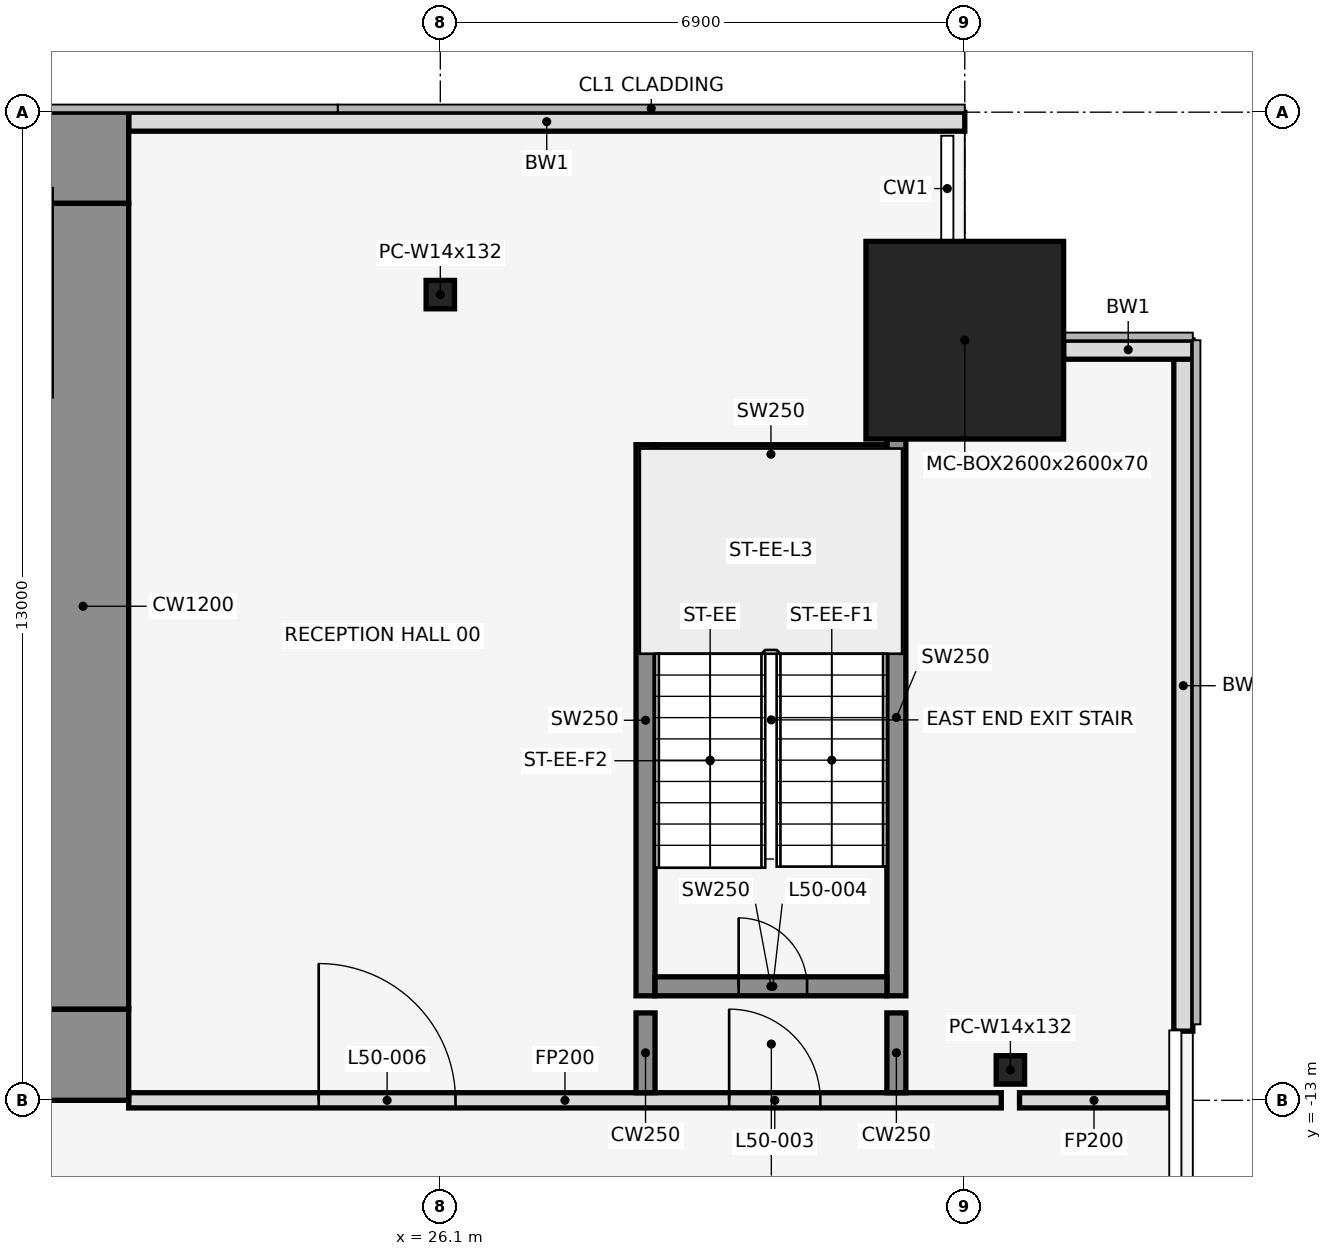
"""IFC4 building model, lengths in metres.
Left out: names, types, materials, properties, quantities, classifications, styles, units other than length and angle.
Written with IfcOpenShell. Run it as: python <this file> out.ifc"""

import sys

from ifc_helpers import new_model, si_unit, direction, frame, frame_2d, origin, origin_2d, place, context, subcontext, project, spatial, rectangle, hollow_rectangle, i_section, extrude, element, fill, save


model = new_model("IFC4")
c1 = context("Model", 3, precision=1e-05, world=origin(), true_north=direction((0.0, 1.0)))
c2 = subcontext(c1, "Body", "Model", "MODEL_VIEW")
j1 = project(units=[si_unit("LENGTHUNIT", "METRE"), si_unit("PLANEANGLEUNIT", "RADIAN")], contexts=[c1])
p1 = place(None, origin())
s1 = spatial("IfcSite", under=j1, at=p1, CompositionType="ELEMENT")
p2 = place(p1, origin())
s2 = spatial("IfcBuilding", under=s1, at=p2, CompositionType="ELEMENT")
p3 = place(p2, frame((0.0, 0.0, 223.7)))
s3 = spatial("IfcBuildingStorey", under=s2, at=p3, CompositionType="ELEMENT", Elevation=223.7)
p4 = place(p3, frame((26.1, -2.4, 0.0), z_axis=(0.0, 0.0, 1.0), x_axis=(1.0, 0.0, 0.0)))
e1 = element("IfcColumn", 1, at=p4, inside=s3, PredefinedType="COLUMN", context=c2, shape_type="SweptSolid", body=[
    extrude(i_section(OverallWidth=0.373, OverallDepth=0.373, WebThickness=0.016, FlangeThickness=0.026, at=origin_2d()), origin(), (0.0, 0.0, 1.0), 4.1),
])
p5 = place(p3, frame((33.0, -3.0, 0.0), z_axis=(0.0, 0.0, 1.0), x_axis=(1.0, 0.0, 0.0)))
e2 = element("IfcColumn", 2, at=p5, inside=s3, PredefinedType="COLUMN", context=c2, shape_type="SweptSolid", body=[
    extrude(hollow_rectangle(XDim=2.6, YDim=2.6, WallThickness=0.07, at=origin_2d()), origin(), (0.0, 0.0, 1.0), 4.1),
])
p6 = place(p3, frame((33.6, -12.6, 0.0), z_axis=(0.0, 0.0, 1.0), x_axis=(1.0, 0.0, 0.0)))
e3 = element("IfcColumn", 3, at=p6, inside=s3, PredefinedType="COLUMN", context=c2, shape_type="SweptSolid", body=[
    extrude(i_section(OverallWidth=0.373, OverallDepth=0.373, WebThickness=0.016, FlangeThickness=0.026, at=origin_2d()), origin(), (0.0, 0.0, 1.0), 4.1),
])
p7 = place(p3, frame((33.0, -0.125, 0.0), z_axis=(0.0, 0.0, 1.0), x_axis=(-1.0, 0.0, 0.0)))
e4 = element("IfcWall", 4, at=p7, inside=s3, PredefinedType="STANDARD", context=c2, shape_type="SweptSolid", body=[
    extrude(rectangle(XDim=11.0, YDim=0.25, at=frame_2d((5.5, 0.0))), origin(), (0.0, 0.0, 1.0), 3.95),
])
p8 = place(p3, frame((35.875, -12.09, 0.0), z_axis=(0.0, 0.0, 1.0), x_axis=(0.0, 1.0, 0.0)))
e5 = element("IfcWall", 5, at=p8, inside=s3, PredefinedType="STANDARD", context=c2, shape_type="SweptSolid", body=[
    extrude(rectangle(XDim=9.09, YDim=0.25, at=frame_2d((4.545, 0.0))), origin(), (0.0, 0.0, 1.0), 3.95),
])
p9 = place(p3, frame((36.0, -3.125, 0.0), z_axis=(0.0, 0.0, 1.0), x_axis=(-1.0, 0.0, 0.0)))
e6 = element("IfcWall", 6, at=p9, inside=s3, PredefinedType="STANDARD", context=c2, shape_type="SweptSolid", body=[
    extrude(rectangle(XDim=1.7, YDim=0.25, at=frame_2d((0.85, 0.0))), origin(), (0.0, 0.0, 1.0), 3.95),
])
p10 = place(p3, frame((28.8, -11.625, 0.0), z_axis=(0.0, 0.0, 1.0), x_axis=(0.0, 1.0, 0.0)))
e7 = element("IfcWall", 7, at=p10, inside=s3, PredefinedType="SHEAR", context=c2, shape_type="SweptSolid", body=[
    extrude(rectangle(XDim=7.25, YDim=0.25, at=frame_2d((3.625, 0.0))), origin(), (0.0, 0.0, 1.0), 4.1),
])
p11 = place(p3, frame((32.1, -11.625, 0.0), z_axis=(0.0, 0.0, 1.0), x_axis=(0.0, 1.0, 0.0)))
e8 = element("IfcWall", 8, at=p11, inside=s3, PredefinedType="SHEAR", context=c2, shape_type="SweptSolid", body=[
    extrude(rectangle(XDim=7.325, YDim=0.25, at=frame_2d((3.663, 0.0))), origin(), (0.0, 0.0, 1.0), 4.1),
])
p12 = place(p3, frame((28.925, -11.5, 0.0), z_axis=(0.0, 0.0, 1.0), x_axis=(1.0, 0.0, 0.0)))
e9 = element("IfcWall", 9, at=p12, inside=s3, PredefinedType="SHEAR", context=c2, shape_type="SweptSolid", body=[
    extrude(rectangle(XDim=3.05, YDim=0.25, at=frame_2d((1.525, 0.0))), origin(), (0.0, 0.0, 1.0), 4.1),
])
p13 = place(p12, frame((1.1, 0.0, 0.0)))
e10 = element("IfcOpeningElement", 10, at=p13, cuts=e9, PredefinedType="OPENING", context=c2, shape_type="SweptSolid", body=[
    extrude(rectangle(XDim=0.9, YDim=2.1, at=frame_2d((0.45, 1.05))), frame((0.0, 0.137, 0.0), z_axis=(0.0, -1.0, 0.0), x_axis=(1.0, 0.0, 0.0)), (0.0, 0.0, 1.0), 0.274),
])
p14 = place(p3, frame((28.925, -4.5, 0.0), z_axis=(0.0, 0.0, 1.0), x_axis=(1.0, 0.0, 0.0)))
e11 = element("IfcWall", 11, at=p14, inside=s3, PredefinedType="SHEAR", context=c2, shape_type="SweptSolid", body=[
    extrude(rectangle(XDim=3.05, YDim=0.25, at=frame_2d((1.525, 0.0))), origin(), (0.0, 0.0, 1.0), 4.1),
])
p15 = place(p3, frame((22.0, -13.0, 0.0), z_axis=(0.0, 0.0, 1.0), x_axis=(1.0, 0.0, 0.0)))
e12 = element("IfcWall", 12, at=p15, inside=s3, PredefinedType="PARTITIONING", context=c2, shape_type="SweptSolid", body=[
    extrude(rectangle(XDim=11.48, YDim=0.2, at=frame_2d((5.74, 0.0))), origin(), (0.0, 0.0, 1.0), 2.84),
])
p16 = place(p15, frame((7.9, 0.0, 0.0)))
e13 = element("IfcOpeningElement", 13, at=p16, cuts=e12, PredefinedType="OPENING", context=c2, shape_type="SweptSolid", body=[
    extrude(rectangle(XDim=1.2, YDim=2.1, at=frame_2d((0.6, 1.05))), frame((0.0, 0.112, 0.0), z_axis=(0.0, -1.0, 0.0), x_axis=(1.0, 0.0, 0.0)), (0.0, 0.0, 1.0), 0.224),
])
p17 = place(p15, frame((2.5, 0.0, 0.0)))
e14 = element("IfcOpeningElement", 14, at=p17, cuts=e12, PredefinedType="OPENING", context=c2, shape_type="SweptSolid", body=[
    extrude(rectangle(XDim=1.8, YDim=2.1, at=frame_2d((0.9, 1.05))), frame((0.0, 0.112, 0.0), z_axis=(0.0, -1.0, 0.0), x_axis=(1.0, 0.0, 0.0)), (0.0, 0.0, 1.0), 0.224),
])
p18 = place(p3, frame((33.72, -13.0, 0.0), z_axis=(0.0, 0.0, 1.0), x_axis=(1.0, 0.0, 0.0)))
e15 = element("IfcWall", 15, at=p18, inside=s3, PredefinedType="PARTITIONING", context=c2, shape_type="SweptSolid", body=[
    extrude(rectangle(XDim=1.96, YDim=0.2, at=frame_2d((0.98, 0.0))), origin(), (0.0, 0.0, 1.0), 2.84),
])
for number, where, z_axis, x_axis in (
    (16, (28.8, -12.9, 0.0), (0.0, 0.0, 1.0), (0.0, 1.0, 0.0)),
    (17, (32.1, -12.9, 0.0), (0.0, 0.0, 1.0), (0.0, 1.0, 0.0)),
):
    element("IfcWall", number, at=place(p3, frame(where, z_axis=z_axis, x_axis=x_axis)), inside=s3, PredefinedType="SHEAR", context=c2, shape_type="SweptSolid", body=[
        extrude(rectangle(XDim=1.05, YDim=0.25, at=frame_2d((0.525, 0.0))), origin(), (0.0, 0.0, 1.0), 4.1),
    ])
p19 = place(p3, frame((-22.0, -0.6, 0.0), z_axis=(0.0, 0.0, 1.0), x_axis=(1.0, 0.0, 0.0)))
e18 = element("IfcWall", 18, at=p19, inside=s3, PredefinedType="SHEAR", context=c2, shape_type="SweptSolid", body=[
    extrude(rectangle(XDim=44.0, YDim=1.2, at=frame_2d((22.0, 0.0))), origin(), (0.0, 0.0, 1.0), 4.1),
])
p20 = place(p19, frame((18.55, 0.0, 0.0)))
e19 = element("IfcOpeningElement", 19, at=p20, cuts=e18, PredefinedType="OPENING", context=c2, shape_type="SweptSolid", body=[
    extrude(rectangle(XDim=0.9, YDim=2.1, at=frame_2d((0.45, 1.05))), frame((0.0, 0.612, 0.0), z_axis=(0.0, -1.0, 0.0), x_axis=(1.0, 0.0, 0.0)), (0.0, 0.0, 1.0), 1.224),
])
p21 = place(p19, frame((24.55, 0.0, 0.0)))
e20 = element("IfcOpeningElement", 20, at=p21, cuts=e18, PredefinedType="OPENING", context=c2, shape_type="SweptSolid", body=[
    extrude(rectangle(XDim=0.9, YDim=2.1, at=frame_2d((0.45, 1.05))), frame((0.0, 0.612, 0.0), z_axis=(0.0, -1.0, 0.0), x_axis=(1.0, 0.0, 0.0)), (0.0, 0.0, 1.0), 1.224),
])
p22 = place(p3, frame((-22.0, -12.4, 0.0), z_axis=(0.0, 0.0, 1.0), x_axis=(1.0, 0.0, 0.0)))
e21 = element("IfcWall", 21, at=p22, inside=s3, PredefinedType="SHEAR", context=c2, shape_type="SweptSolid", body=[
    extrude(rectangle(XDim=44.0, YDim=1.2, at=frame_2d((22.0, 0.0))), origin(), (0.0, 0.0, 1.0), 4.1),
])
p23 = place(p22, frame((2.2, 0.0, 0.0)))
e22 = element("IfcOpeningElement", 22, at=p23, cuts=e21, PredefinedType="OPENING", context=c2, shape_type="SweptSolid", body=[
    extrude(rectangle(XDim=1.2, YDim=2.1, at=frame_2d((0.6, 1.05))), frame((0.0, 0.612, 0.0), z_axis=(0.0, -1.0, 0.0), x_axis=(1.0, 0.0, 0.0)), (0.0, 0.0, 1.0), 1.224),
])
p24 = place(p22, frame((21.4, 0.0, 0.0)))
e23 = element("IfcOpeningElement", 23, at=p24, cuts=e21, PredefinedType="OPENING", context=c2, shape_type="SweptSolid", body=[
    extrude(rectangle(XDim=1.2, YDim=2.1, at=frame_2d((0.6, 1.05))), frame((0.0, 0.612, 0.0), z_axis=(0.0, -1.0, 0.0), x_axis=(1.0, 0.0, 0.0)), (0.0, 0.0, 1.0), 1.224),
])
p25 = place(p22, frame((40.6, 0.0, 0.0)))
e24 = element("IfcOpeningElement", 24, at=p25, cuts=e21, PredefinedType="OPENING", context=c2, shape_type="SweptSolid", body=[
    extrude(rectangle(XDim=1.2, YDim=2.1, at=frame_2d((0.6, 1.05))), frame((0.0, 0.612, 0.0), z_axis=(0.0, -1.0, 0.0), x_axis=(1.0, 0.0, 0.0)), (0.0, 0.0, 1.0), 1.224),
])
p26 = place(p22, frame((16.0, 0.0, 0.0)))
e25 = element("IfcOpeningElement", 25, at=p26, cuts=e21, PredefinedType="OPENING", context=c2, shape_type="SweptSolid", body=[
    extrude(rectangle(XDim=1.8, YDim=2.1, at=frame_2d((0.9, 1.05))), frame((0.0, 0.612, 0.0), z_axis=(0.0, -1.0, 0.0), x_axis=(1.0, 0.0, 0.0)), (0.0, 0.0, 1.0), 1.224),
])
p27 = place(p22, frame((6.3, 0.0, 0.0)))
e26 = element("IfcOpeningElement", 26, at=p27, cuts=e21, PredefinedType="OPENING", context=c2, shape_type="SweptSolid", body=[
    extrude(rectangle(XDim=1.2, YDim=2.1, at=frame_2d((0.6, 1.05))), frame((0.0, 0.612, 0.0), z_axis=(0.0, -1.0, 0.0), x_axis=(1.0, 0.0, 0.0)), (0.0, 0.0, 1.0), 1.224),
])
p28 = place(p22, frame((26.2, 0.0, 0.0)))
e27 = element("IfcOpeningElement", 27, at=p28, cuts=e21, PredefinedType="OPENING", context=c2, shape_type="SweptSolid", body=[
    extrude(rectangle(XDim=1.8, YDim=2.1, at=frame_2d((0.9, 1.05))), frame((0.0, 0.612, 0.0), z_axis=(0.0, -1.0, 0.0), x_axis=(1.0, 0.0, 0.0)), (0.0, 0.0, 1.0), 1.224),
])
p29 = place(p22, frame((36.5, 0.0, 0.0)))
e28 = element("IfcOpeningElement", 28, at=p29, cuts=e21, PredefinedType="OPENING", context=c2, shape_type="SweptSolid", body=[
    extrude(rectangle(XDim=1.2, YDim=2.1, at=frame_2d((0.6, 1.05))), frame((0.0, 0.612, 0.0), z_axis=(0.0, -1.0, 0.0), x_axis=(1.0, 0.0, 0.0)), (0.0, 0.0, 1.0), 1.224),
])
p30 = place(p3, frame((21.4, -11.8, 0.0), z_axis=(0.0, 0.0, 1.0), x_axis=(0.0, 1.0, 0.0)))
e29 = element("IfcWall", 29, at=p30, inside=s3, PredefinedType="SHEAR", context=c2, shape_type="SweptSolid", body=[
    extrude(rectangle(XDim=10.6, YDim=1.2, at=frame_2d((5.3, 0.0))), origin(), (0.0, 0.0, 1.0), 4.1),
])
p31 = place(p16, origin())
e30 = element("IfcDoor", 30, at=p31, inside=s3, OperationType="SINGLE_SWING_RIGHT", PredefinedType="DOOR", context=c2, shape_type="SweptSolid", body=[
    extrude(rectangle(XDim=1.2, YDim=2.1, at=frame_2d((0.6, 1.05))), frame((0.0, 0.025, 0.0), z_axis=(0.0, -1.0, 0.0), x_axis=(1.0, 0.0, 0.0)), (0.0, 0.0, 1.0), 0.05),
])
fill(e13, e30)
p32 = place(p13, origin())
e31 = element("IfcDoor", 31, at=p32, inside=s3, OperationType="SINGLE_SWING_LEFT", PredefinedType="DOOR", context=c2, shape_type="SweptSolid", body=[
    extrude(rectangle(XDim=0.9, YDim=2.1, at=frame_2d((0.45, 1.05))), frame((0.0, 0.025, 0.0), z_axis=(0.0, -1.0, 0.0), x_axis=(1.0, 0.0, 0.0)), (0.0, 0.0, 1.0), 0.05),
])
fill(e10, e31)
p33 = place(p17, origin())
e32 = element("IfcDoor", 32, at=p33, inside=s3, OperationType="SINGLE_SWING_LEFT", PredefinedType="DOOR", context=c2, shape_type="SweptSolid", body=[
    extrude(rectangle(XDim=1.8, YDim=2.1, at=frame_2d((0.9, 1.05))), frame((0.0, 0.025, 0.0), z_axis=(0.0, -1.0, 0.0), x_axis=(1.0, 0.0, 0.0)), (0.0, 0.0, 1.0), 0.05),
])
fill(e14, e32)
save(model, sys.argv[1])
